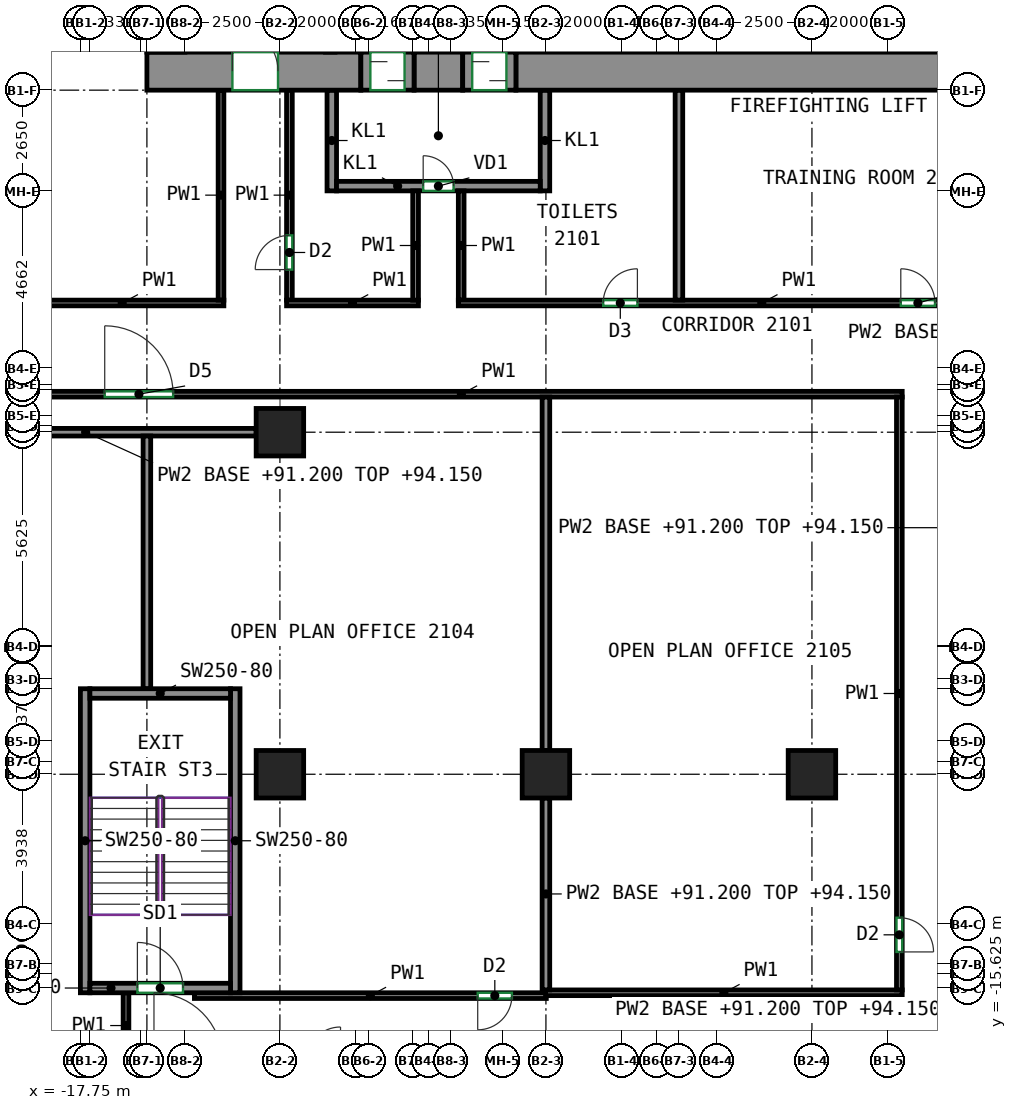
"""IFC4 building model, lengths in metres.
Left out: names, types, materials, properties, quantities, classifications, styles, units other than length and angle.
Written with IfcOpenShell. Run it as: python <this file> out.ifc"""

import sys

from ifc_helpers import new_model, si_unit, direction, frame, frame_2d, origin, origin_2d, place, context, subcontext, project, spatial, rectangle, extrude, source, transform, mapped, element, fill, save


model = new_model("IFC4")
c1 = context("Model", 3, precision=1e-05, world=origin(), true_north=direction((0.0, 1.0)))
c2 = subcontext(c1, "Body", "Model", "MODEL_VIEW")
j1 = project(units=[si_unit("LENGTHUNIT", "METRE"), si_unit("PLANEANGLEUNIT", "RADIAN")], contexts=[c1])
p1 = place(None, origin())
s1 = spatial("IfcSite", under=j1, at=p1, CompositionType="ELEMENT")
p2 = place(p1, origin())
s2 = spatial("IfcBuilding", under=s1, at=p2, CompositionType="ELEMENT")
p3 = place(p2, frame((0.0, 0.0, 91.2)))
s3 = spatial("IfcBuildingStorey", under=s2, at=p3, CompositionType="ELEMENT", Elevation=91.2)
m1 = source(origin(), c2, "Body", "SweptSolid", [
    extrude(rectangle(XDim=1.25, YDim=1.25, at=origin_2d()), origin(), (0.0, 0.0, 1.0), 3.6),
])
for number, where, z_axis, x_axis in (
    (1, (-12.5, -10.0, 0.0), (0.0, 0.0, 1.0), (1.0, 0.0, 0.0)),
    (2, (-12.5, -1.0, 0.0), (0.0, 0.0, 1.0), (1.0, 0.0, 0.0)),
    (3, (-5.5, -10.0, 0.0), (0.0, 0.0, 1.0), (1.0, 0.0, 0.0)),
    (4, (1.5, -10.0, 0.0), (0.0, 0.0, 1.0), (1.0, 0.0, 0.0)),
):
    element("IfcColumn", number, at=place(p3, frame(where, z_axis=z_axis, x_axis=x_axis)), inside=s3, PredefinedType="COLUMN", context=c2, shape_type="MappedRepresentation", body=[
        mapped(m1, transform((0.0, 0.0, 0.0))),
    ])
m2 = source(origin(), c2, "Body", "SweptSolid", [
    extrude(rectangle(XDim=5.63, YDim=1.0, at=frame_2d((2.815, 0.0))), origin(), (0.0, 0.0, 1.0), 3.6),
])
p4 = place(p3, frame((-16.0, 8.5, 0.0), z_axis=(0.0, 0.0, 1.0), x_axis=(1.0, 0.0, 0.0)))
e5 = element("IfcWall", 5, at=p4, inside=s3, PredefinedType="SHEAR", context=c2, shape_type="MappedRepresentation", body=[
    mapped(m2, transform((0.0, 0.0, 0.0))),
])
p5 = place(p4, frame((2.25, 0.0, 0.0)))
e6 = element("IfcOpeningElement", 6, at=p5, cuts=e5, PredefinedType="OPENING", context=c2, shape_type="SweptSolid", body=[
    extrude(rectangle(XDim=1.2, YDim=2.1, at=frame_2d((0.6, 1.05))), frame((0.0, 0.51, 0.0), z_axis=(0.0, -1.0, 0.0), x_axis=(1.0, 0.0, 0.0)), (0.0, 0.0, 1.0), 1.02),
])
m3 = source(origin(), c2, "Body", "SweptSolid", [
    extrude(rectangle(XDim=1.28, YDim=1.0, at=frame_2d((0.64, 0.0))), origin(), (0.0, 0.0, 1.0), 3.6),
])
p6 = place(p3, frame((-8.97, 8.5, 0.0), z_axis=(0.0, 0.0, 1.0), x_axis=(1.0, 0.0, 0.0)))
e7 = element("IfcWall", 7, at=p6, inside=s3, PredefinedType="SHEAR", context=c2, shape_type="MappedRepresentation", body=[
    mapped(m3, transform((0.0, 0.0, 0.0))),
])
m4 = source(origin(), c2, "Body", "SweptSolid", [
    extrude(rectangle(XDim=14.18, YDim=1.0, at=frame_2d((7.09, 0.0))), origin(), (0.0, 0.0, 1.0), 3.6),
])
p7 = place(p3, frame((-6.29, 8.5, 0.0), z_axis=(0.0, 0.0, 1.0), x_axis=(1.0, 0.0, 0.0)))
e8 = element("IfcWall", 8, at=p7, inside=s3, PredefinedType="SHEAR", context=c2, shape_type="MappedRepresentation", body=[
    mapped(m4, transform((0.0, 0.0, 0.0))),
])
m5 = source(origin(), c2, "Body", "SweptSolid", [
    extrude(rectangle(XDim=8.0, YDim=0.25, at=frame_2d((4.0, 0.0))), origin(), (0.0, 0.0, 1.0), 3.6),
])
for number, where, z_axis, x_axis in (
    (9, (-17.625, -15.75, 0.0), (0.0, 0.0, 1.0), (0.0, 1.0, 0.0)),
    (10, (-13.675, -15.75, 0.0), (0.0, 0.0, 1.0), (0.0, 1.0, 0.0)),
):
    element("IfcWall", number, at=place(p3, frame(where, z_axis=z_axis, x_axis=x_axis)), inside=s3, PredefinedType="SHEAR", context=c2, shape_type="MappedRepresentation", body=[
        mapped(m5, transform((0.0, 0.0, 0.0))),
    ])
m6 = source(origin(), c2, "Body", "SweptSolid", [
    extrude(rectangle(XDim=3.7, YDim=0.25, at=frame_2d((1.85, 0.0))), origin(), (0.0, 0.0, 1.0), 3.6),
])
p8 = place(p3, frame((-17.5, -15.625, 0.0), z_axis=(0.0, 0.0, 1.0), x_axis=(1.0, 0.0, 0.0)))
e11 = element("IfcWall", 11, at=p8, inside=s3, PredefinedType="SHEAR", context=c2, shape_type="MappedRepresentation", body=[
    mapped(m6, transform((0.0, 0.0, 0.0))),
])
p9 = place(p8, frame((1.25, 0.0, 0.0)))
e12 = element("IfcOpeningElement", 12, at=p9, cuts=e11, PredefinedType="OPENING", context=c2, shape_type="SweptSolid", body=[
    extrude(rectangle(XDim=1.2, YDim=2.1, at=frame_2d((0.6, 1.05))), frame((0.0, 0.135, 0.0), z_axis=(0.0, -1.0, 0.0), x_axis=(1.0, 0.0, 0.0)), (0.0, 0.0, 1.0), 0.27),
])
p10 = place(p3, frame((-17.5, -7.875, 0.0), z_axis=(0.0, 0.0, 1.0), x_axis=(1.0, 0.0, 0.0)))
e13 = element("IfcWall", 13, at=p10, inside=s3, PredefinedType="SHEAR", context=c2, shape_type="MappedRepresentation", body=[
    mapped(m6, transform((0.0, 0.0, 0.0))),
])
m7 = source(origin(), c2, "Body", "SweptSolid", [
    extrude(rectangle(XDim=2.65, YDim=0.25, at=frame_2d((1.325, 0.0))), origin(), (0.0, 0.0, 1.0), 3.6),
])
for number, where, z_axis, x_axis in (
    (14, (-11.135, 5.35, 0.0), (0.0, 0.0, 1.0), (0.0, 1.0, 0.0)),
    (15, (-5.525, 5.35, 0.0), (0.0, 0.0, 1.0), (0.0, 1.0, 0.0)),
):
    element("IfcWall", number, at=place(p3, frame(where, z_axis=z_axis, x_axis=x_axis)), inside=s3, PredefinedType="PARTITIONING", context=c2, shape_type="MappedRepresentation", body=[
        mapped(m7, transform((0.0, 0.0, 0.0))),
    ])
m8 = source(origin(), c2, "Body", "SweptSolid", [
    extrude(rectangle(XDim=5.36, YDim=0.25, at=frame_2d((2.68, 0.0))), origin(), (0.0, 0.0, 1.0), 3.6),
])
p11 = place(p3, frame((-11.01, 5.475, 0.0), z_axis=(0.0, 0.0, 1.0), x_axis=(1.0, 0.0, 0.0)))
e16 = element("IfcWall", 16, at=p11, inside=s3, PredefinedType="PARTITIONING", context=c2, shape_type="MappedRepresentation", body=[
    mapped(m8, transform((0.0, 0.0, 0.0))),
])
p12 = place(p11, frame((2.28, 0.0, 0.0)))
e17 = element("IfcOpeningElement", 17, at=p12, cuts=e16, PredefinedType="OPENING", context=c2, shape_type="SweptSolid", body=[
    extrude(rectangle(XDim=0.8, YDim=2.0, at=frame_2d((0.4, 1.0))), frame((0.0, 0.135, 0.0), z_axis=(0.0, -1.0, 0.0), x_axis=(1.0, 0.0, 0.0)), (0.0, 0.0, 1.0), 0.27),
])
m9 = source(origin(), c2, "Body", "SweptSolid", [
    extrude(rectangle(XDim=1.4, YDim=1.0, at=frame_2d((0.7, 0.0))), origin(), (0.0, 0.0, 1.0), 2.7),
])
p13 = place(p3, frame((-10.37, 8.5, 0.0), z_axis=(0.0, 0.0, 1.0), x_axis=(1.0, 0.0, 0.0)))
e18 = element("IfcWall", 18, at=p13, inside=s3, PredefinedType="PARTITIONING", context=c2, shape_type="MappedRepresentation", body=[
    mapped(m9, transform((0.0, 0.0, 0.0))),
])
p14 = place(p13, frame((0.25, 0.0, 0.0)))
e19 = element("IfcOpeningElement", 19, at=p14, cuts=e18, PredefinedType="OPENING", context=c2, shape_type="SweptSolid", body=[
    extrude(rectangle(XDim=0.9, YDim=2.1, at=frame_2d((0.45, 1.05))), frame((0.0, 0.51, 0.0), z_axis=(0.0, -1.0, 0.0), x_axis=(1.0, 0.0, 0.0)), (0.0, 0.0, 1.0), 1.02),
])
m10 = source(origin(), c2, "Body", "SweptSolid", [
    extrude(rectangle(XDim=1.4, YDim=1.0, at=frame_2d((0.7, 0.0))), origin(), (0.0, 0.0, 1.0), 2.7),
])
p15 = place(p3, frame((-7.69, 8.5, 0.0), z_axis=(0.0, 0.0, 1.0), x_axis=(1.0, 0.0, 0.0)))
e20 = element("IfcWall", 20, at=p15, inside=s3, PredefinedType="PARTITIONING", context=c2, shape_type="MappedRepresentation", body=[
    mapped(m10, transform((0.0, 0.0, 0.0))),
])
p16 = place(p15, frame((0.25, 0.0, 0.0)))
e21 = element("IfcOpeningElement", 21, at=p16, cuts=e20, PredefinedType="OPENING", context=c2, shape_type="SweptSolid", body=[
    extrude(rectangle(XDim=0.9, YDim=2.1, at=frame_2d((0.45, 1.05))), frame((0.0, 0.51, 0.0), z_axis=(0.0, -1.0, 0.0), x_axis=(1.0, 0.0, 0.0)), (0.0, 0.0, 1.0), 1.02),
])
p17 = place(p3, frame((-16.55, -15.75, 0.0), z_axis=(0.0, 0.0, 1.0), x_axis=(0.0, -1.0, 0.0)))
e22 = element("IfcWall", 22, at=p17, inside=s3, PredefinedType="PARTITIONING", context=c2, shape_type="SweptSolid", body=[
    extrude(rectangle(XDim=1.725, YDim=0.15, at=frame_2d((0.863, 0.0))), origin(), (0.0, 0.0, 1.0), 3.6),
])
p18 = place(p3, frame((-19.325, 0.0, 0.0), z_axis=(0.0, 0.0, 1.0), x_axis=(1.0, 0.0, 0.0)))
e23 = element("IfcWall", 23, at=p18, inside=s3, PredefinedType="PARTITIONING", context=c2, shape_type="SweptSolid", body=[
    extrude(rectangle(XDim=23.2, YDim=0.15, at=frame_2d((11.6, 0.0))), origin(), (0.0, 0.0, 1.0), 3.6),
])
p19 = place(p18, frame((2.215, 0.0, 0.0)))
e24 = element("IfcOpeningElement", 24, at=p19, cuts=e23, PredefinedType="OPENING", context=c2, shape_type="SweptSolid", body=[
    extrude(rectangle(XDim=1.8, YDim=2.1, at=frame_2d((0.9, 1.05))), frame((0.0, 0.085, 0.0), z_axis=(0.0, -1.0, 0.0), x_axis=(1.0, 0.0, 0.0)), (0.0, 0.0, 1.0), 0.17),
])
p20 = place(p3, frame((-19.325, 2.4, 0.0), z_axis=(0.0, 0.0, 1.0), x_axis=(1.0, 0.0, 0.0)))
e25 = element("IfcWall", 25, at=p20, inside=s3, PredefinedType="PARTITIONING", context=c2, shape_type="SweptSolid", body=[
    extrude(rectangle(XDim=5.35, YDim=0.15, at=frame_2d((2.675, 0.0))), origin(), (0.0, 0.0, 1.0), 3.6),
])
p21 = place(p3, frame((-14.05, 8.0, 0.0), z_axis=(0.0, 0.0, 1.0), x_axis=(0.0, -1.0, 0.0)))
e26 = element("IfcWall", 26, at=p21, inside=s3, PredefinedType="PARTITIONING", context=c2, shape_type="SweptSolid", body=[
    extrude(rectangle(XDim=5.525, YDim=0.15, at=frame_2d((2.762, 0.0))), origin(), (0.0, 0.0, 1.0), 3.6),
])
p22 = place(p3, frame((-5.49, -15.825, 0.0), z_axis=(0.0, 0.0, 1.0), x_axis=(-1.0, 0.0, 0.0)))
e27 = element("IfcWall", 27, at=p22, inside=s3, PredefinedType="PARTITIONING", context=c2, shape_type="SweptSolid", body=[
    extrude(rectangle(XDim=9.26, YDim=0.15, at=frame_2d((4.63, 0.0))), origin(), (0.0, 0.0, 1.0), 3.6),
])
p23 = place(p22, frame((0.905, 0.0, 0.0)))
e28 = element("IfcOpeningElement", 28, at=p23, cuts=e27, PredefinedType="OPENING", context=c2, shape_type="SweptSolid", body=[
    extrude(rectangle(XDim=0.9, YDim=2.1, at=frame_2d((0.45, 1.05))), frame((0.0, 0.085, 0.0), z_axis=(0.0, -1.0, 0.0), x_axis=(1.0, 0.0, 0.0)), (0.0, 0.0, 1.0), 0.17),
])
p24 = place(p3, frame((3.875, -15.75, 0.0), z_axis=(0.0, 0.0, 1.0), x_axis=(-1.0, 0.0, 0.0)))
e29 = element("IfcWall", 29, at=p24, inside=s3, PredefinedType="PARTITIONING", context=c2, shape_type="SweptSolid", body=[
    extrude(rectangle(XDim=9.385, YDim=0.15, at=frame_2d((4.692, 0.0))), origin(), (0.0, 0.0, 1.0), 3.6),
])
p25 = place(p3, frame((3.8, -0.075, 0.0), z_axis=(0.0, 0.0, 1.0), x_axis=(0.0, -1.0, 0.0)))
e30 = element("IfcWall", 30, at=p25, inside=s3, PredefinedType="PARTITIONING", context=c2, shape_type="SweptSolid", body=[
    extrude(rectangle(XDim=15.6, YDim=0.15, at=frame_2d((7.8, 0.0))), origin(), (0.0, 0.0, 1.0), 3.6),
])
p26 = place(p25, frame((13.7, 0.0, 0.0)))
e31 = element("IfcOpeningElement", 31, at=p26, cuts=e30, PredefinedType="OPENING", context=c2, shape_type="SweptSolid", body=[
    extrude(rectangle(XDim=0.9, YDim=2.1, at=frame_2d((0.45, 1.05))), frame((0.0, 0.085, 0.0), z_axis=(0.0, -1.0, 0.0), x_axis=(1.0, 0.0, 0.0)), (0.0, 0.0, 1.0), 0.17),
])
p27 = place(p3, frame((-12.25, 2.475, 0.0), z_axis=(0.0, 0.0, 1.0), x_axis=(0.0, 1.0, 0.0)))
e32 = element("IfcWall", 32, at=p27, inside=s3, PredefinedType="PARTITIONING", context=c2, shape_type="SweptSolid", body=[
    extrude(rectangle(XDim=5.525, YDim=0.15, at=frame_2d((2.762, 0.0))), origin(), (0.0, 0.0, 1.0), 3.6),
])
p28 = place(p27, frame((0.804, 0.0, 0.0)))
e33 = element("IfcOpeningElement", 33, at=p28, cuts=e32, PredefinedType="OPENING", context=c2, shape_type="SweptSolid", body=[
    extrude(rectangle(XDim=0.9, YDim=2.1, at=frame_2d((0.45, 1.05))), frame((0.0, 0.085, 0.0), z_axis=(0.0, -1.0, 0.0), x_axis=(1.0, 0.0, 0.0)), (0.0, 0.0, 1.0), 0.17),
])
p29 = place(p3, frame((-12.325, 2.4, 0.0), z_axis=(0.0, 0.0, 1.0), x_axis=(1.0, 0.0, 0.0)))
e34 = element("IfcWall", 34, at=p29, inside=s3, PredefinedType="PARTITIONING", context=c2, shape_type="SweptSolid", body=[
    extrude(rectangle(XDim=3.47, YDim=0.15, at=frame_2d((1.735, 0.0))), origin(), (0.0, 0.0, 1.0), 3.6),
])
for number, where, z_axis, x_axis in (
    (35, (-8.93, 5.35, 0.0), (0.0, 0.0, 1.0), (0.0, -1.0, 0.0)),
    (36, (-7.73, 2.475, 0.0), (0.0, 0.0, 1.0), (0.0, 1.0, 0.0)),
):
    element("IfcWall", number, at=place(p3, frame(where, z_axis=z_axis, x_axis=x_axis)), inside=s3, PredefinedType="PARTITIONING", context=c2, shape_type="SweptSolid", body=[
        extrude(rectangle(XDim=2.875, YDim=0.15, at=frame_2d((1.438, 0.0))), origin(), (0.0, 0.0, 1.0), 3.6),
    ])
p30 = place(p3, frame((-7.805, 2.4, 0.0), z_axis=(0.0, 0.0, 1.0), x_axis=(1.0, 0.0, 0.0)))
e37 = element("IfcWall", 37, at=p30, inside=s3, PredefinedType="PARTITIONING", context=c2, shape_type="SweptSolid", body=[
    extrude(rectangle(XDim=15.97, YDim=0.15, at=frame_2d((7.985, 0.0))), origin(), (0.0, 0.0, 1.0), 3.6),
])
p31 = place(p30, frame((3.812, 0.0, 0.0)))
e38 = element("IfcOpeningElement", 38, at=p31, cuts=e37, PredefinedType="OPENING", context=c2, shape_type="SweptSolid", body=[
    extrude(rectangle(XDim=0.9, YDim=2.1, at=frame_2d((0.45, 1.05))), frame((0.0, 0.085, 0.0), z_axis=(0.0, -1.0, 0.0), x_axis=(1.0, 0.0, 0.0)), (0.0, 0.0, 1.0), 0.17),
])
p32 = place(p30, frame((11.643, 0.0, 0.0)))
e39 = element("IfcOpeningElement", 39, at=p32, cuts=e37, PredefinedType="OPENING", context=c2, shape_type="SweptSolid", body=[
    extrude(rectangle(XDim=0.9, YDim=2.1, at=frame_2d((0.45, 1.05))), frame((0.0, 0.085, 0.0), z_axis=(0.0, -1.0, 0.0), x_axis=(1.0, 0.0, 0.0)), (0.0, 0.0, 1.0), 0.17),
])
p33 = place(p3, frame((-22.1, -1.0, 0.0), z_axis=(0.0, 0.0, 1.0), x_axis=(1.0, 0.0, 0.0)))
e40 = element("IfcWall", 40, at=p33, inside=s3, PredefinedType="PARTITIONING", context=c2, shape_type="SweptSolid", body=[
    extrude(rectangle(XDim=8.975, YDim=0.2, at=frame_2d((4.488, 0.0))), origin(), (0.0, 0.0, 1.0), 2.95),
])
p34 = place(p3, frame((-16.0, -7.75, 0.0), z_axis=(0.0, 0.0, 1.0), x_axis=(0.0, 1.0, 0.0)))
e41 = element("IfcWall", 41, at=p34, inside=s3, PredefinedType="PARTITIONING", context=c2, shape_type="SweptSolid", body=[
    extrude(rectangle(XDim=6.65, YDim=0.2, at=frame_2d((3.325, 0.0))), origin(), (0.0, 0.0, 1.0), 3.6),
])
p35 = place(p3, frame((-5.5, -9.375, 0.0), z_axis=(0.0, 0.0, 1.0), x_axis=(0.0, 1.0, 0.0)))
e42 = element("IfcWall", 42, at=p35, inside=s3, PredefinedType="PARTITIONING", context=c2, shape_type="SweptSolid", body=[
    extrude(rectangle(XDim=9.299, YDim=0.2, at=frame_2d((4.649, 0.0))), origin(), (0.0, 0.0, 1.0), 3.6),
])
p36 = place(p3, frame((-5.5, -15.674, 0.0), z_axis=(0.0, 0.0, 1.0), x_axis=(0.0, 1.0, 0.0)))
e43 = element("IfcWall", 43, at=p36, inside=s3, PredefinedType="PARTITIONING", context=c2, shape_type="SweptSolid", body=[
    extrude(rectangle(XDim=5.049, YDim=0.2, at=frame_2d((2.524, 0.0))), origin(), (0.0, 0.0, 1.0), 2.95),
])
p37 = place(p3, frame((-2.0, 2.476, 0.0), z_axis=(0.0, 0.0, 1.0), x_axis=(0.0, 1.0, 0.0)))
e44 = element("IfcWall", 44, at=p37, inside=s3, PredefinedType="PARTITIONING", context=c2, shape_type="SweptSolid", body=[
    extrude(rectangle(XDim=5.524, YDim=0.2, at=frame_2d((2.762, 0.0))), origin(), (0.0, 0.0, 1.0), 3.6),
])
p38 = place(p12, origin())
e45 = element("IfcDoor", 45, at=p38, inside=s3, OperationType="SINGLE_SWING_LEFT", PredefinedType="DOOR", context=c2, shape_type="SweptSolid", body=[
    extrude(rectangle(XDim=0.8, YDim=2.0, at=frame_2d((0.4, 1.0))), frame((0.0, 0.025, 0.0), z_axis=(0.0, -1.0, 0.0), x_axis=(1.0, 0.0, 0.0)), (0.0, 0.0, 1.0), 0.05),
])
fill(e17, e45)
p39 = place(p14, origin())
e46 = element("IfcDoor", 46, at=p39, inside=s3, OperationType="SLIDING_TO_LEFT", PredefinedType="DOOR", context=c2, shape_type="SweptSolid", body=[
    extrude(rectangle(XDim=0.9, YDim=2.1, at=frame_2d((0.45, 1.05))), frame((0.0, 0.405, 0.0), z_axis=(0.0, -1.0, 0.0), x_axis=(1.0, 0.0, 0.0)), (0.0, 0.0, 1.0), 0.05),
])
fill(e19, e46)
p40 = place(p16, origin())
e47 = element("IfcDoor", 47, at=p40, inside=s3, OperationType="SLIDING_TO_RIGHT", PredefinedType="DOOR", context=c2, shape_type="SweptSolid", body=[
    extrude(rectangle(XDim=0.9, YDim=2.1, at=frame_2d((0.45, 1.05))), frame((0.0, 0.405, 0.0), z_axis=(0.0, -1.0, 0.0), x_axis=(1.0, 0.0, 0.0)), (0.0, 0.0, 1.0), 0.05),
])
fill(e21, e47)
p41 = place(p5, origin())
e48 = element("IfcDoor", 48, at=p41, inside=s3, OperationType="DOUBLE_DOOR_SINGLE_SWING", PredefinedType="DOOR", context=c2, shape_type="SweptSolid", body=[
    extrude(rectangle(XDim=1.2, YDim=2.1, at=frame_2d((0.6, 1.05))), frame((0.0, 0.405, 0.0), z_axis=(0.0, -1.0, 0.0), x_axis=(1.0, 0.0, 0.0)), (0.0, 0.0, 1.0), 0.05),
])
fill(e6, e48)
p42 = place(p9, origin())
e49 = element("IfcDoor", 49, at=p42, inside=s3, OperationType="DOUBLE_DOOR_SINGLE_SWING", PredefinedType="DOOR", context=c2, shape_type="SweptSolid", body=[
    extrude(rectangle(XDim=1.2, YDim=2.1, at=frame_2d((0.6, 1.05))), frame((0.0, 0.025, 0.0), z_axis=(0.0, -1.0, 0.0), x_axis=(1.0, 0.0, 0.0)), (0.0, 0.0, 1.0), 0.05),
])
fill(e12, e49)
p43 = place(p23, origin())
e50 = element("IfcDoor", 50, at=p43, inside=s3, OperationType="SINGLE_SWING_RIGHT", PredefinedType="DOOR", context=c2, shape_type="SweptSolid", body=[
    extrude(rectangle(XDim=0.9, YDim=2.1, at=frame_2d((0.45, 1.05))), frame((0.0, 0.025, 0.0), z_axis=(0.0, -1.0, 0.0), x_axis=(1.0, 0.0, 0.0)), (0.0, 0.0, 1.0), 0.05),
])
fill(e28, e50)
p44 = place(p26, origin())
e51 = element("IfcDoor", 51, at=p44, inside=s3, OperationType="SINGLE_SWING_RIGHT", PredefinedType="DOOR", context=c2, shape_type="SweptSolid", body=[
    extrude(rectangle(XDim=0.9, YDim=2.1, at=frame_2d((0.45, 1.05))), frame((0.0, 0.025, 0.0), z_axis=(0.0, -1.0, 0.0), x_axis=(1.0, 0.0, 0.0)), (0.0, 0.0, 1.0), 0.05),
])
fill(e31, e51)
p45 = place(p19, origin())
e52 = element("IfcDoor", 52, at=p45, inside=s3, OperationType="DOUBLE_DOOR_SINGLE_SWING", PredefinedType="DOOR", context=c2, shape_type="SweptSolid", body=[
    extrude(rectangle(XDim=1.8, YDim=2.1, at=frame_2d((0.9, 1.05))), frame((0.0, 0.025, 0.0), z_axis=(0.0, -1.0, 0.0), x_axis=(1.0, 0.0, 0.0)), (0.0, 0.0, 1.0), 0.05),
])
fill(e24, e52)
p46 = place(p31, origin())
e53 = element("IfcDoor", 53, at=p46, inside=s3, OperationType="SINGLE_SWING_RIGHT", PredefinedType="DOOR", context=c2, shape_type="SweptSolid", body=[
    extrude(rectangle(XDim=0.9, YDim=2.1, at=frame_2d((0.45, 1.05))), frame((0.0, 0.025, 0.0), z_axis=(0.0, -1.0, 0.0), x_axis=(1.0, 0.0, 0.0)), (0.0, 0.0, 1.0), 0.05),
])
fill(e38, e53)
p47 = place(p32, origin())
e54 = element("IfcDoor", 54, at=p47, inside=s3, OperationType="SINGLE_SWING_LEFT", PredefinedType="DOOR", context=c2, shape_type="SweptSolid", body=[
    extrude(rectangle(XDim=0.9, YDim=2.1, at=frame_2d((0.45, 1.05))), frame((0.0, 0.025, 0.0), z_axis=(0.0, -1.0, 0.0), x_axis=(1.0, 0.0, 0.0)), (0.0, 0.0, 1.0), 0.05),
])
fill(e39, e54)
p48 = place(p28, origin())
e55 = element("IfcDoor", 55, at=p48, inside=s3, OperationType="SINGLE_SWING_LEFT", PredefinedType="DOOR", context=c2, shape_type="SweptSolid", body=[
    extrude(rectangle(XDim=0.9, YDim=2.1, at=frame_2d((0.45, 1.05))), frame((0.0, 0.025, 0.0), z_axis=(0.0, -1.0, 0.0), x_axis=(1.0, 0.0, 0.0)), (0.0, 0.0, 1.0), 0.05),
])
fill(e33, e55)
save(model, sys.argv[1])
